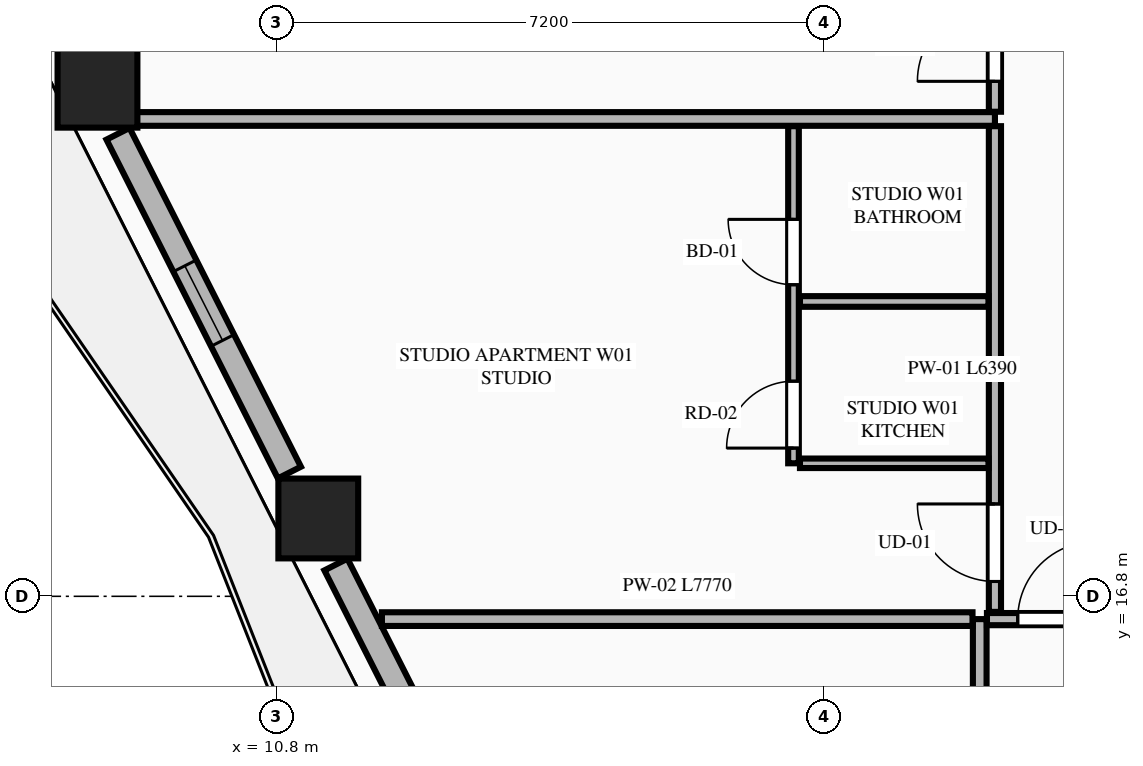
"""IFC4 building model, lengths in metres.
Left out: names, types, materials, properties, quantities, classifications, styles, units other than length and angle.
Written with IfcOpenShell. Run it as: python <this file> out.ifc"""

import sys

from ifc_helpers import new_model, si_unit, direction, frame, frame_2d, origin, origin_2d, place, context, subcontext, project, spatial, rectangle, extrude, element, fill, save


model = new_model("IFC4")
c1 = context("Model", 3, precision=1e-05, world=origin(), true_north=direction((0.0, 1.0)))
c2 = subcontext(c1, "Body", "Model", "MODEL_VIEW")
j1 = project(units=[si_unit("LENGTHUNIT", "METRE"), si_unit("PLANEANGLEUNIT", "RADIAN")], contexts=[c1])
p1 = place(None, origin())
s1 = spatial("IfcSite", under=j1, at=p1, CompositionType="ELEMENT")
p2 = place(p1, origin())
s2 = spatial("IfcBuilding", under=s1, at=p2, CompositionType="ELEMENT")
p3 = place(p2, frame((0.0, 0.0, 112.6)))
s3 = spatial("IfcBuildingStorey", under=s2, at=p3, CompositionType="ELEMENT", Elevation=112.6)
for number, where, z_axis, x_axis in (
    (1, (8.443, 23.491, 0.0), (0.0, 0.0, 1.0), (1.0, 0.0, 0.0)),
    (2, (11.348, 17.824, 0.0), (0.0, 0.0, 1.0), (1.0, 0.0, 0.0)),
):
    element("IfcColumn", number, at=place(p3, frame(where, z_axis=z_axis, x_axis=x_axis)), inside=s3, PredefinedType="COLUMN", context=c2, shape_type="SweptSolid", body=[
        extrude(rectangle(XDim=1.05, YDim=1.05, at=origin_2d()), origin(), (0.0, 0.0, 1.0), 3.55),
    ])
p4 = place(p3, frame((8.713, 22.885, 0.0), z_axis=(0.0, 0.0, 1.0), x_axis=(0.451470533039, -0.892286029139, 0.0)))
e3 = element("IfcWall", 3, at=p4, inside=s3, PredefinedType="STANDARD", context=c2, shape_type="SweptSolid", body=[
    extrude(rectangle(XDim=4.995, YDim=0.34, at=frame_2d((2.498, 0.0))), origin(), (0.0, 0.0, 1.0), 2.797),
])
p5 = place(p4, frame((1.947, 0.0, 0.75)))
e4 = element("IfcOpeningElement", 4, at=p5, cuts=e3, PredefinedType="OPENING", context=c2, shape_type="SweptSolid", body=[
    extrude(rectangle(XDim=1.1, YDim=1.897, at=frame_2d((0.55, 0.948))), frame((0.0, 0.18, 0.0), z_axis=(0.0, -1.0, 0.0), x_axis=(1.0, 0.0, 0.0)), (0.0, 0.0, 1.0), 0.36),
])
p6 = place(p3, frame((11.58, 17.218, 0.0), z_axis=(0.0, 0.0, 1.0), x_axis=(0.451567731634, -0.892236842855, 0.0)))
e5 = element("IfcWall", 5, at=p6, inside=s3, PredefinedType="STANDARD", context=c2, shape_type="SweptSolid", body=[
    extrude(rectangle(XDim=5.219, YDim=0.34, at=frame_2d((2.61, 0.0))), origin(), (0.0, 0.0, 1.0), 2.797),
])
p7 = place(p6, frame((2.587, 0.0, 0.0)))
e6 = element("IfcOpeningElement", 6, at=p7, cuts=e5, PredefinedType="OPENING", context=c2, shape_type="SweptSolid", body=[
    extrude(rectangle(XDim=1.1, YDim=2.25, at=frame_2d((0.55, 1.125))), frame((0.0, 0.18, 0.0), z_axis=(0.0, -1.0, 0.0), x_axis=(1.0, 0.0, 0.0)), (0.0, 0.0, 1.0), 0.36),
])
p8 = place(p3, frame((20.05, 4.105, 0.0), z_axis=(0.0, 0.0, 1.0), x_axis=(0.0, 1.0, 0.0)))
e7 = element("IfcWall", 7, at=p8, inside=s3, PredefinedType="PARTITIONING", context=c2, shape_type="SweptSolid", body=[
    extrude(rectangle(XDim=12.395, YDim=0.18, at=frame_2d((6.198, 0.0))), origin(), (0.0, 0.0, 1.0), 3.34),
])
p9 = place(p3, frame((20.145, 16.5, 0.0), z_axis=(0.0, 0.0, 1.0), x_axis=(1.0, 0.0, 0.0)))
e8 = element("IfcWall", 8, at=p9, inside=s3, PredefinedType="PARTITIONING", context=c2, shape_type="SweptSolid", body=[
    extrude(rectangle(XDim=8.328, YDim=0.16, at=frame_2d((4.164, 0.0))), origin(), (0.0, 0.0, 1.0), 3.34),
])
p10 = place(p9, frame((0.405, 0.0, 0.0)))
e9 = element("IfcOpeningElement", 9, at=p10, cuts=e8, PredefinedType="OPENING", context=c2, shape_type="SweptSolid", body=[
    extrude(rectangle(XDim=1.02, YDim=2.25, at=frame_2d((0.51, 1.125))), frame((0.0, 0.09, 0.0), z_axis=(0.0, -1.0, 0.0), x_axis=(1.0, 0.0, 0.0)), (0.0, 0.0, 1.0), 0.18),
])
p11 = place(p3, frame((12.185, 16.5, 0.0), z_axis=(0.0, 0.0, 1.0), x_axis=(1.0, 0.0, 0.0)))
e10 = element("IfcWall", 10, at=p11, inside=s3, PredefinedType="PARTITIONING", context=c2, shape_type="SweptSolid", body=[
    extrude(rectangle(XDim=7.77, YDim=0.18, at=frame_2d((3.885, 0.0))), origin(), (0.0, 0.0, 1.0), 3.34),
])
p12 = place(p3, frame((20.25, 16.595, 0.0), z_axis=(0.0, 0.0, 1.0), x_axis=(0.0, 1.0, 0.0)))
e11 = element("IfcWall", 11, at=p12, inside=s3, PredefinedType="PARTITIONING", context=c2, shape_type="SweptSolid", body=[
    extrude(rectangle(XDim=6.39, YDim=0.16, at=frame_2d((3.195, 0.0))), origin(), (0.0, 0.0, 1.0), 3.34),
])
p13 = place(p12, frame((0.4, 0.0, 0.0)))
e12 = element("IfcOpeningElement", 12, at=p13, cuts=e11, PredefinedType="OPENING", context=c2, shape_type="SweptSolid", body=[
    extrude(rectangle(XDim=1.02, YDim=2.25, at=frame_2d((0.51, 1.125))), frame((0.0, 0.09, 0.0), z_axis=(0.0, -1.0, 0.0), x_axis=(1.0, 0.0, 0.0)), (0.0, 0.0, 1.0), 0.18),
])
p14 = place(p3, frame((17.685, 18.55, 0.0), z_axis=(0.0, 0.0, 1.0), x_axis=(1.0, 0.0, 0.0)))
e13 = element("IfcWall", 13, at=p14, inside=s3, PredefinedType="PARTITIONING", context=c2, shape_type="SweptSolid", body=[
    extrude(rectangle(XDim=2.48, YDim=0.125, at=frame_2d((1.24, 0.0))), origin(), (0.0, 0.0, 1.0), 2.722),
])
p15 = place(p3, frame((17.6, 18.55, 0.0), z_axis=(0.0, 0.0, 1.0), x_axis=(0.0, 1.0, 0.0)))
e14 = element("IfcWall", 14, at=p15, inside=s3, PredefinedType="PLUMBINGWALL", context=c2, shape_type="SweptSolid", body=[
    extrude(rectangle(XDim=4.435, YDim=0.14, at=frame_2d((2.218, 0.0))), origin(), (0.0, 0.0, 1.0), 3.34),
])
p16 = place(p15, frame((2.349, 0.0, 0.0)))
e15 = element("IfcOpeningElement", 15, at=p16, cuts=e14, PredefinedType="OPENING", context=c2, shape_type="SweptSolid", body=[
    extrude(rectangle(XDim=0.86, YDim=2.1, at=frame_2d((0.43, 1.05))), frame((0.0, 0.08, 0.0), z_axis=(0.0, -1.0, 0.0), x_axis=(1.0, 0.0, 0.0)), (0.0, 0.0, 1.0), 0.16),
])
p17 = place(p15, frame((0.2, 0.0, 0.0)))
e16 = element("IfcOpeningElement", 16, at=p17, cuts=e14, PredefinedType="OPENING", context=c2, shape_type="SweptSolid", body=[
    extrude(rectangle(XDim=0.88, YDim=2.15, at=frame_2d((0.44, 1.075))), frame((0.0, 0.08, 0.0), z_axis=(0.0, -1.0, 0.0), x_axis=(1.0, 0.0, 0.0)), (0.0, 0.0, 1.0), 0.16),
])
p18 = place(p3, frame((17.685, 20.679, 0.0), z_axis=(0.0, 0.0, 1.0), x_axis=(1.0, 0.0, 0.0)))
e17 = element("IfcWall", 17, at=p18, inside=s3, PredefinedType="PLUMBINGWALL", context=c2, shape_type="SweptSolid", body=[
    extrude(rectangle(XDim=2.48, YDim=0.14, at=frame_2d((1.24, 0.0))), origin(), (0.0, 0.0, 1.0), 3.34),
])
p19 = place(p3, frame((8.856, 23.08, 0.0), z_axis=(0.0, 0.0, 1.0), x_axis=(1.0, 0.0, 0.0)))
e18 = element("IfcWall", 18, at=p19, inside=s3, PredefinedType="PARTITIONING", context=c2, shape_type="SweptSolid", body=[
    extrude(rectangle(XDim=11.394, YDim=0.18, at=frame_2d((5.697, 0.0))), origin(), (0.0, 0.0, 1.0), 3.34),
])
p20 = place(p3, frame((20.25, 23.175, 0.0), z_axis=(0.0, 0.0, 1.0), x_axis=(0.0, 1.0, 0.0)))
e19 = element("IfcWall", 19, at=p20, inside=s3, PredefinedType="PARTITIONING", context=c2, shape_type="SweptSolid", body=[
    extrude(rectangle(XDim=6.014, YDim=0.16, at=frame_2d((3.007, 0.0))), origin(), (0.0, 0.0, 1.0), 3.34),
])
p21 = place(p20, frame((0.4, 0.0, 0.0)))
e20 = element("IfcOpeningElement", 20, at=p21, cuts=e19, PredefinedType="OPENING", context=c2, shape_type="SweptSolid", body=[
    extrude(rectangle(XDim=1.02, YDim=2.25, at=frame_2d((0.51, 1.125))), frame((0.0, 0.09, 0.0), z_axis=(0.0, -1.0, 0.0), x_axis=(1.0, 0.0, 0.0)), (0.0, 0.0, 1.0), 0.18),
])
p22 = place(p5, origin())
e21 = element("IfcWindow", 21, at=p22, inside=s3, PartitioningType="SINGLE_PANEL", PredefinedType="WINDOW", context=c2, shape_type="SweptSolid", body=[
    extrude(rectangle(XDim=1.1, YDim=1.897, at=frame_2d((0.55, 0.948))), frame((0.0, 0.03, 0.0), z_axis=(0.0, -1.0, 0.0), x_axis=(1.0, 0.0, 0.0)), (0.0, 0.0, 1.0), 0.06),
])
fill(e4, e21)
p23 = place(p10, origin())
e22 = element("IfcDoor", 22, at=p23, inside=s3, OperationType="SINGLE_SWING_RIGHT", PredefinedType="DOOR", context=c2, shape_type="SweptSolid", body=[
    extrude(rectangle(XDim=1.02, YDim=2.25, at=frame_2d((0.51, 1.125))), frame((0.0, 0.025, 0.0), z_axis=(0.0, -1.0, 0.0), x_axis=(1.0, 0.0, 0.0)), (0.0, 0.0, 1.0), 0.05),
])
fill(e9, e22)
p24 = place(p16, origin())
e23 = element("IfcDoor", 23, at=p24, inside=s3, OperationType="SINGLE_SWING_RIGHT", PredefinedType="DOOR", context=c2, shape_type="SweptSolid", body=[
    extrude(rectangle(XDim=0.86, YDim=2.1, at=frame_2d((0.43, 1.05))), frame((0.0, 0.025, 0.0), z_axis=(0.0, -1.0, 0.0), x_axis=(1.0, 0.0, 0.0)), (0.0, 0.0, 1.0), 0.05),
])
fill(e15, e23)
p25 = place(p13, origin())
e24 = element("IfcDoor", 24, at=p25, inside=s3, OperationType="SINGLE_SWING_RIGHT", PredefinedType="DOOR", context=c2, shape_type="SweptSolid", body=[
    extrude(rectangle(XDim=1.02, YDim=2.25, at=frame_2d((0.51, 1.125))), frame((0.0, 0.025, 0.0), z_axis=(0.0, -1.0, 0.0), x_axis=(1.0, 0.0, 0.0)), (0.0, 0.0, 1.0), 0.05),
])
fill(e12, e24)
p26 = place(p17, origin())
e25 = element("IfcDoor", 25, at=p26, inside=s3, OperationType="SINGLE_SWING_LEFT", PredefinedType="DOOR", context=c2, shape_type="SweptSolid", body=[
    extrude(rectangle(XDim=0.88, YDim=2.15, at=frame_2d((0.44, 1.075))), frame((0.0, 0.025, 0.0), z_axis=(0.0, -1.0, 0.0), x_axis=(1.0, 0.0, 0.0)), (0.0, 0.0, 1.0), 0.05),
])
fill(e16, e25)
p27 = place(p21, origin())
e26 = element("IfcDoor", 26, at=p27, inside=s3, OperationType="SINGLE_SWING_LEFT", PredefinedType="DOOR", context=c2, shape_type="SweptSolid", body=[
    extrude(rectangle(XDim=1.02, YDim=2.25, at=frame_2d((0.51, 1.125))), frame((0.0, 0.025, 0.0), z_axis=(0.0, -1.0, 0.0), x_axis=(1.0, 0.0, 0.0)), (0.0, 0.0, 1.0), 0.05),
])
fill(e20, e26)
save(model, sys.argv[1])
